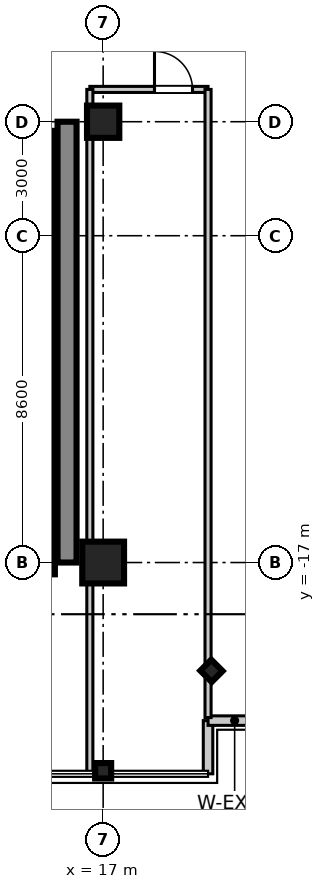
"""IFC4 building model, lengths in metres.
Left out: names, types, materials, properties, quantities, classifications, styles, units other than length and angle.
Written with IfcOpenShell. Run it as: python <this file> out.ifc"""

import sys

from ifc_helpers import new_model, si_unit, direction, frame, frame_2d, origin, origin_2d, place, context, subcontext, project, spatial, rectangle, i_section, extrude, source, transform, mapped, element, fill, save


model = new_model("IFC4")
c1 = context("Model", 3, precision=1e-05, world=origin(), true_north=direction((0.0, 1.0)))
c2 = subcontext(c1, "Body", "Model", "MODEL_VIEW")
j1 = project(units=[si_unit("LENGTHUNIT", "METRE"), si_unit("PLANEANGLEUNIT", "RADIAN")], contexts=[c1])
p1 = place(None, origin())
s1 = spatial("IfcSite", under=j1, at=p1, CompositionType="ELEMENT")
p2 = place(p1, origin())
s2 = spatial("IfcBuilding", under=s1, at=p2, CompositionType="ELEMENT")
p3 = place(p2, frame((0.0, 0.0, 192.8)))
s3 = spatial("IfcBuildingStorey", under=s2, at=p3, CompositionType="ELEMENT", Elevation=192.8)
m1 = source(origin(), c2, "Body", "SweptSolid", [
    extrude(rectangle(XDim=1.1, YDim=1.1, at=origin_2d()), origin(), (0.0, 0.0, 1.0), 3.605),
])
p4 = place(p3, frame((17.0, -17.0, 0.0), z_axis=(0.0, 0.0, 1.0), x_axis=(1.0, 0.0, 0.0)))
e1 = element("IfcColumn", 1, at=p4, inside=s3, PredefinedType="COLUMN", context=c2, shape_type="MappedRepresentation", body=[
    mapped(m1, transform((0.0, 0.0, 0.0), scale=1.0)),
])
m2 = source(origin(), c2, "Body", "SweptSolid", [
    extrude(rectangle(XDim=0.85, YDim=0.85, at=origin_2d()), origin(), (0.0, 0.0, 1.0), 3.605),
])
p5 = place(p3, frame((17.0, -5.4, 0.0), z_axis=(0.0, 0.0, 1.0), x_axis=(1.0, 0.0, 0.0)))
e2 = element("IfcColumn", 2, at=p5, inside=s3, PredefinedType="PILASTER", context=c2, shape_type="MappedRepresentation", body=[
    mapped(m2, transform((0.0, 0.0, 0.0), scale=1.0)),
])
m3 = source(origin(), c2, "Body", "SweptSolid", [
    extrude(i_section(OverallWidth=0.406, OverallDepth=0.422, WebThickness=0.019, FlangeThickness=0.03, at=origin_2d()), origin(), (0.0, 0.0, 1.0), 3.605),
])
for number, where, z_axis, x_axis in (
    (3, (17.0, -22.48, 0.0), (0.0, 0.0, 1.0), (0.0, 1.0, 0.0)),
    (4, (19.85, -19.85, 0.0), (0.0, 0.0, 1.0), (0.707, 0.707, 0.0)),
):
    element("IfcColumn", number, at=place(p3, frame(where, z_axis=z_axis, x_axis=x_axis)), inside=s3, PredefinedType="COLUMN", context=c2, shape_type="MappedRepresentation", body=[
        mapped(m3, transform((0.0, 0.0, 0.0), scale=1.0)),
    ])
m4 = source(origin(), c2, "Body", "SweptSolid", [
    extrude(rectangle(XDim=11.6, YDim=0.5, at=frame_2d((5.8, 0.0))), origin(), (0.0, 0.0, 1.0), 3.39),
])
p6 = place(p3, frame((16.05, -17.0, 0.0), z_axis=(0.0, 0.0, 1.0), x_axis=(0.0, 1.0, 0.0)))
e5 = element("IfcWall", 5, at=p6, inside=s3, PredefinedType="SHEAR", context=c2, shape_type="MappedRepresentation", body=[
    mapped(m4, transform((0.0, 0.0, 0.0), scale=1.0)),
])
m5 = source(origin(), c2, "Body", "SweptSolid", [
    extrude(rectangle(XDim=2.36, YDim=0.22, at=frame_2d((1.18, 0.0))), origin(), (0.0, 0.0, 1.0), 3.39),
])
p7 = place(p3, frame((15.62, -8.0, 0.0), z_axis=(0.0, 0.0, 1.0), x_axis=(0.0, 1.0, 0.0)))
e6 = element("IfcWall", 6, at=p7, inside=s3, PredefinedType="SHEAR", context=c2, shape_type="MappedRepresentation", body=[
    mapped(m5, transform((0.0, 0.0, 0.0), scale=1.0)),
])
m6 = source(origin(), c2, "Body", "SweptSolid", [
    extrude(rectangle(XDim=2.2, YDim=0.22, at=frame_2d((1.1, 0.0))), origin(), (0.0, 0.0, 1.0), 3.39),
])
for number, where, z_axis, x_axis in (
    (7, (15.62, -10.2, 0.0), (0.0, 0.0, 1.0), (0.0, 1.0, 0.0)),
    (8, (15.62, -12.4, 0.0), (0.0, 0.0, 1.0), (0.0, 1.0, 0.0)),
):
    element("IfcWall", number, at=place(p3, frame(where, z_axis=z_axis, x_axis=x_axis)), inside=s3, PredefinedType="SHEAR", context=c2, shape_type="MappedRepresentation", body=[
        mapped(m6, transform((0.0, 0.0, 0.0), scale=1.0)),
    ])
m7 = source(origin(), c2, "Body", "SweptSolid", [
    extrude(rectangle(XDim=2.3, YDim=0.22, at=frame_2d((1.15, 0.0))), origin(), (0.0, 0.0, 1.0), 3.39),
])
p8 = place(p3, frame((15.62, -14.7, 0.0), z_axis=(0.0, 0.0, 1.0), x_axis=(0.0, 1.0, 0.0)))
e9 = element("IfcWall", 9, at=p8, inside=s3, PredefinedType="SHEAR", context=c2, shape_type="MappedRepresentation", body=[
    mapped(m7, transform((0.0, 0.0, 0.0), scale=1.0)),
])
m8 = source(origin(), c2, "Body", "SweptSolid", [
    extrude(rectangle(XDim=2.61, YDim=0.22, at=frame_2d((1.305, 0.0))), origin(), (0.0, 0.0, 1.0), 3.39),
])
p9 = place(p3, frame((15.62, -17.31, 0.0), z_axis=(0.0, 0.0, 1.0), x_axis=(0.0, 1.0, 0.0)))
e10 = element("IfcWall", 10, at=p9, inside=s3, PredefinedType="SHEAR", context=c2, shape_type="MappedRepresentation", body=[
    mapped(m8, transform((0.0, 0.0, 0.0), scale=1.0)),
])
m9 = source(origin(), c2, "Body", "SweptSolid", [
    extrude(rectangle(XDim=1.4, YDim=0.25, at=frame_2d((0.7, 0.0))), origin(), (0.0, 0.0, 1.0), 3.39),
])
p10 = place(p3, frame((19.76, -22.56, 0.0), z_axis=(0.0, 0.0, 1.0), x_axis=(0.0, 1.0, 0.0)))
e11 = element("IfcWall", 11, at=p10, inside=s3, PredefinedType="STANDARD", context=c2, shape_type="MappedRepresentation", body=[
    mapped(m9, transform((0.0, 0.0, 0.0), scale=1.0)),
])
m10 = source(origin(), c2, "Body", "SweptSolid", [
    extrude(rectangle(XDim=1.4, YDim=0.25, at=frame_2d((0.7, 0.0))), origin(), (0.0, 0.0, 1.0), 3.39),
])
p11 = place(p3, frame((19.76, -21.16, 0.0), z_axis=(0.0, 0.0, 1.0), x_axis=(1.0, 0.0, 0.0)))
e12 = element("IfcWall", 12, at=p11, inside=s3, PredefinedType="STANDARD", context=c2, shape_type="MappedRepresentation", body=[
    mapped(m10, transform((0.0, 0.0, 0.0), scale=1.0)),
])
m11 = source(origin(), c2, "Body", "SweptSolid", [
    extrude(rectangle(XDim=3.11, YDim=0.16, at=frame_2d((1.555, 0.0))), origin(), (0.0, 0.0, 1.0), 2.73),
])
p12 = place(p3, frame((16.65, -4.55, 0.0), z_axis=(0.0, 0.0, 1.0), x_axis=(1.0, 0.0, 0.0)))
e13 = element("IfcWall", 13, at=p12, inside=s3, PredefinedType="PARTITIONING", context=c2, shape_type="MappedRepresentation", body=[
    mapped(m11, transform((0.0, 0.0, 0.0), scale=1.0)),
])
p13 = place(p12, frame((1.701, 0.0, 0.0)))
e14 = element("IfcOpeningElement", 14, at=p13, cuts=e13, PredefinedType="OPENING", context=c2, shape_type="SweptSolid", body=[
    extrude(rectangle(XDim=1.0, YDim=2.1, at=frame_2d((0.5, 1.05))), frame((0.0, 0.09, 0.0), z_axis=(0.0, -1.0, 0.0), x_axis=(1.0, 0.0, 0.0)), (0.0, 0.0, 1.0), 0.18),
])
m12 = source(origin(), c2, "Body", "SweptSolid", [
    extrude(rectangle(XDim=17.95, YDim=0.16, at=frame_2d((8.975, 0.0))), origin(), (0.0, 0.0, 1.0), 2.73),
])
p14 = place(p3, frame((16.65, -22.5, 0.0), z_axis=(0.0, 0.0, 1.0), x_axis=(0.0, 1.0, 0.0)))
e15 = element("IfcWall", 15, at=p14, inside=s3, PredefinedType="PARTITIONING", context=c2, shape_type="MappedRepresentation", body=[
    mapped(m12, transform((0.0, 0.0, 0.0), scale=1.0)),
])
m13 = source(origin(), c2, "Body", "SweptSolid", [
    extrude(rectangle(XDim=16.53, YDim=0.16, at=frame_2d((8.265, 0.0))), origin(), (0.0, 0.0, 1.0), 2.73),
])
p15 = place(p3, frame((19.76, -21.08, 0.0), z_axis=(0.0, 0.0, 1.0), x_axis=(0.0, 1.0, 0.0)))
e16 = element("IfcWall", 16, at=p15, inside=s3, PredefinedType="PARTITIONING", context=c2, shape_type="MappedRepresentation", body=[
    mapped(m13, transform((0.0, 0.0, 0.0), scale=1.0)),
])
m14 = source(origin(), c2, "Body", "SweptSolid", [
    extrude(rectangle(XDim=1.0, YDim=2.1, at=frame_2d((0.5, 1.05))), frame((0.0, 0.025, 0.0), z_axis=(0.0, -1.0, 0.0), x_axis=(1.0, 0.0, 0.0)), (0.0, 0.0, 1.0), 0.05),
])
p16 = place(p13, frame((1.0, 0.0, 0.0), z_axis=(0.0, 0.0, 1.0), x_axis=(-1.0, 0.0, 0.0)))
e17 = element("IfcDoor", 17, at=p16, inside=s3, OperationType="SINGLE_SWING_LEFT", PredefinedType="DOOR", context=c2, shape_type="MappedRepresentation", body=[
    mapped(m14, transform((0.0, 0.0, 0.0), scale=1.0)),
])
fill(e14, e17)
save(model, sys.argv[1])
